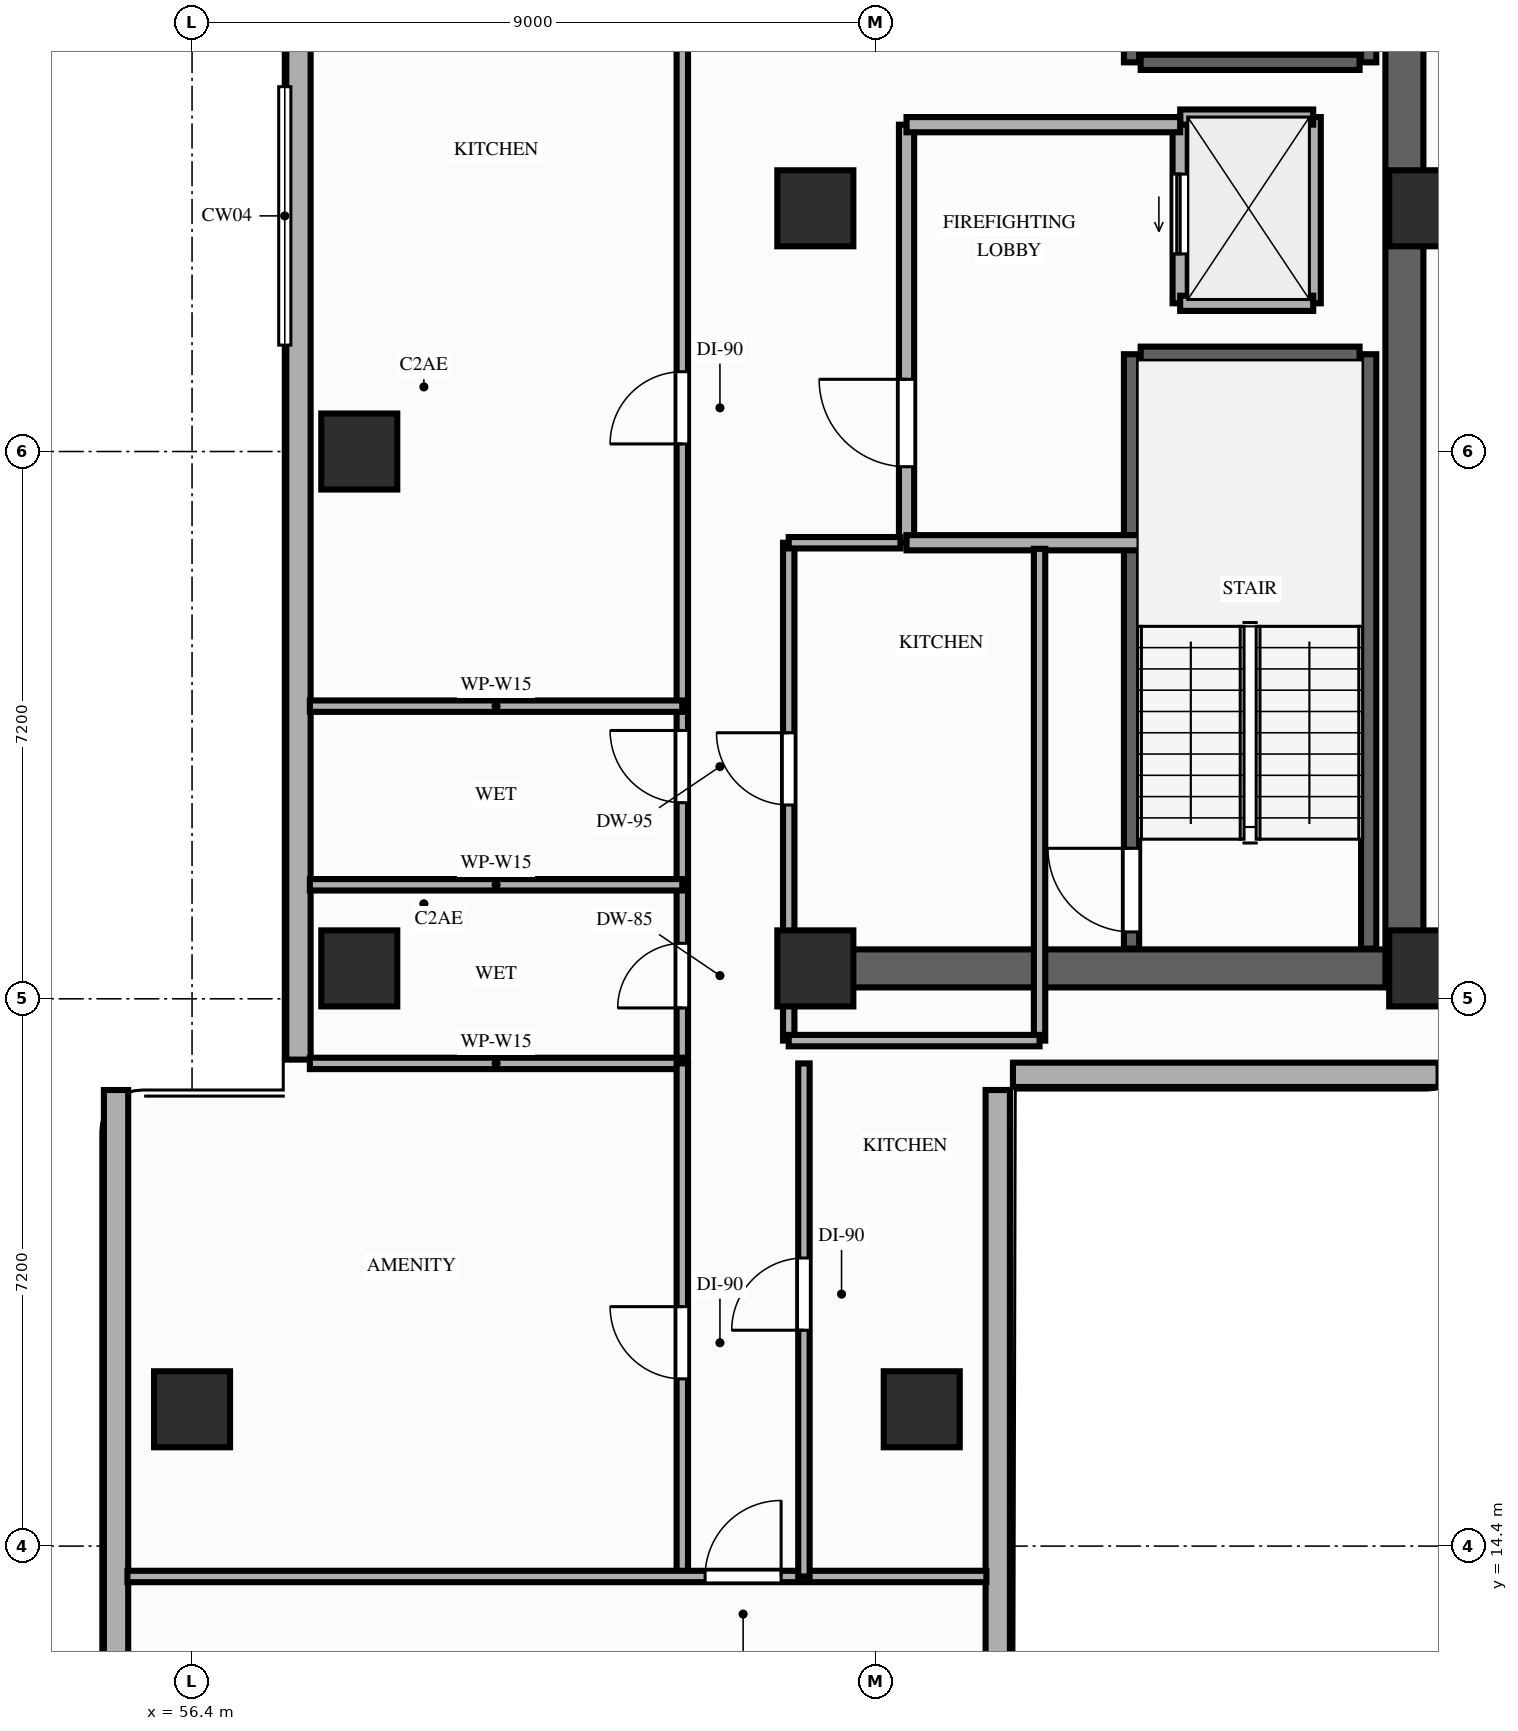
"""IFC4 building model, lengths in metres.
Left out: names, types, materials, properties, quantities, classifications, styles, units other than length and angle.
Written with IfcOpenShell. Run it as: python <this file> out.ifc"""

import sys

from ifc_helpers import new_model, si_unit, direction, frame, frame_2d, origin, origin_2d, place, context, subcontext, project, spatial, rectangle, extrude, element, fill, save


model = new_model("IFC4")
c1 = context("Model", 3, precision=1e-05, world=origin(), true_north=direction((0.0, 1.0)))
c2 = subcontext(c1, "Body", "Model", "MODEL_VIEW")
j1 = project(units=[si_unit("LENGTHUNIT", "METRE"), si_unit("PLANEANGLEUNIT", "RADIAN")], contexts=[c1])
p1 = place(None, origin())
s1 = spatial("IfcSite", under=j1, at=p1, CompositionType="ELEMENT")
p2 = place(p1, origin())
s2 = spatial("IfcBuilding", under=s1, at=p2, CompositionType="ELEMENT")
p3 = place(p2, frame((0.0, 0.0, 39.8)))
s3 = spatial("IfcBuildingStorey", under=s2, at=p3, CompositionType="ELEMENT", Elevation=39.8)
for number, where, z_axis, x_axis in (
    (1, (64.6, 22.0, 0.0), (0.0, 0.0, 1.0), (1.0, 0.0, 0.0)),
    (2, (72.65, 22.0, 0.0), (0.0, 0.0, 1.0), (1.0, 0.0, 0.0)),
    (3, (64.6, 32.0, 0.0), (0.0, 0.0, 1.0), (1.0, 0.0, 0.0)),
    (4, (72.65, 32.0, 0.0), (0.0, 0.0, 1.0), (1.0, 0.0, 0.0)),
    (5, (58.6, 22.0, 0.0), (0.0, 0.0, 1.0), (1.0, 0.0, 0.0)),
    (6, (58.6, 28.8, 0.0), (0.0, 0.0, 1.0), (1.0, 0.0, 0.0)),
    (7, (56.4, 16.2, 0.0), (0.0, 0.0, 1.0), (1.0, 0.0, 0.0)),
    (8, (66.0, 16.2, 0.0), (0.0, 0.0, 1.0), (1.0, 0.0, 0.0)),
):
    element("IfcColumn", number, at=place(p3, frame(where, z_axis=z_axis, x_axis=x_axis)), inside=s3, PredefinedType="COLUMN", context=c2, shape_type="SweptSolid", body=[
        extrude(rectangle(XDim=1.0, YDim=1.0, at=origin_2d()), origin(), (0.0, 0.0, 1.0), 3.8),
    ])
p4 = place(p3, frame((57.8, 43.4, 0.0), z_axis=(0.0, 0.0, 1.0), x_axis=(0.0, -1.0, 0.0)))
e9 = element("IfcWall", 9, at=p4, inside=s3, PredefinedType="STANDARD", context=c2, shape_type="SweptSolid", body=[
    extrude(rectangle(XDim=22.6, YDim=0.32, at=frame_2d((11.3, 0.0))), origin(), (0.0, 0.0, 1.0), 3.11),
])
p5 = place(p4, frame((3.6, 0.0, 0.85)))
e10 = element("IfcOpeningElement", 10, at=p5, cuts=e9, PredefinedType="OPENING", context=c2, shape_type="SweptSolid", body=[
    extrude(rectangle(XDim=1.6, YDim=1.7, at=frame_2d((0.8, 0.85))), frame((0.0, 0.17, 0.0), z_axis=(0.0, -1.0, 0.0), x_axis=(1.0, 0.0, 0.0)), (0.0, 0.0, 1.0), 0.34),
])
for number, where, z_axis, x_axis in (
    (11, (55.4, 20.4, 0.0), (0.0, 0.0, 1.0), (0.0, -1.0, 0.0)),
    (12, (67.0, 7.6, 0.0), (0.0, 0.0, 1.0), (0.0, 1.0, 0.0)),
):
    element("IfcWall", number, at=place(p3, frame(where, z_axis=z_axis, x_axis=x_axis)), inside=s3, PredefinedType="STANDARD", context=c2, shape_type="SweptSolid", body=[
        extrude(rectangle(XDim=12.8, YDim=0.32, at=frame_2d((6.4, 0.0))), origin(), (0.0, 0.0, 1.0), 3.62),
    ])
p6 = place(p3, frame((67.2, 20.6, 0.0), z_axis=(0.0, 0.0, 1.0), x_axis=(1.0, 0.0, 0.0)))
e13 = element("IfcWall", 13, at=p6, inside=s3, PredefinedType="STANDARD", context=c2, shape_type="SweptSolid", body=[
    extrude(rectangle(XDim=5.6, YDim=0.32, at=frame_2d((2.8, 0.0))), origin(), (0.0, 0.0, 1.0), 3.62),
])
p7 = place(p3, frame((72.35, 22.0, 0.0), z_axis=(0.0, 0.0, 1.0), x_axis=(0.0, 1.0, 0.0)))
e14 = element("IfcWall", 14, at=p7, inside=s3, PredefinedType="SHEAR", context=c2, shape_type="SweptSolid", body=[
    extrude(rectangle(XDim=20.25, YDim=0.5, at=frame_2d((10.125, 0.0))), origin(), (0.0, 0.0, 1.0), 3.62),
])
p8 = place(p3, frame((64.6, 22.0, 0.0), z_axis=(0.0, 0.0, 1.0), x_axis=(1.0, 0.0, 0.0)))
e15 = element("IfcWall", 15, at=p8, inside=s3, PredefinedType="SHEAR", context=c2, shape_type="SweptSolid", body=[
    extrude(rectangle(XDim=7.5, YDim=0.5, at=frame_2d((3.75, 0.0))), origin(), (0.0, 0.0, 1.0), 3.62),
])
p9 = place(p3, frame((68.76, 22.26, 0.0), z_axis=(0.0, 0.0, 1.0), x_axis=(0.0, 1.0, 0.0)))
e16 = element("IfcWall", 16, at=p9, inside=s3, PredefinedType="SHEAR", context=c2, shape_type="SweptSolid", body=[
    extrude(rectangle(XDim=7.82, YDim=0.2, at=frame_2d((3.91, 0.0))), origin(), (0.0, 0.0, 1.0), 3.62),
])
p10 = place(p9, frame((0.22, 0.0, 0.0)))
e17 = element("IfcOpeningElement", 17, at=p10, cuts=e16, PredefinedType="OPENING", context=c2, shape_type="SweptSolid", body=[
    extrude(rectangle(XDim=1.1, YDim=2.15, at=frame_2d((0.55, 1.075))), frame((0.0, 0.11, 0.0), z_axis=(0.0, -1.0, 0.0), x_axis=(1.0, 0.0, 0.0)), (0.0, 0.0, 1.0), 0.22),
])
p11 = place(p3, frame((71.88, 22.26, 0.0), z_axis=(0.0, 0.0, 1.0), x_axis=(0.0, 1.0, 0.0)))
e18 = element("IfcWall", 18, at=p11, inside=s3, PredefinedType="SHEAR", context=c2, shape_type="SweptSolid", body=[
    extrude(rectangle(XDim=7.82, YDim=0.2, at=frame_2d((3.91, 0.0))), origin(), (0.0, 0.0, 1.0), 3.62),
])
p12 = place(p3, frame((68.88, 30.08, 0.0), z_axis=(0.0, 0.0, 1.0), x_axis=(1.0, 0.0, 0.0)))
e19 = element("IfcWall", 19, at=p12, inside=s3, PredefinedType="SHEAR", context=c2, shape_type="SweptSolid", body=[
    extrude(rectangle(XDim=2.88, YDim=0.2, at=frame_2d((1.44, 0.0))), origin(), (0.0, 0.0, 1.0), 3.62),
])
p13 = place(p3, frame((68.76, 33.92, 0.0), z_axis=(0.0, 0.0, 1.0), x_axis=(0.0, 1.0, 0.0)))
e20 = element("IfcWall", 20, at=p13, inside=s3, PredefinedType="SHEAR", context=c2, shape_type="SweptSolid", body=[
    extrude(rectangle(XDim=7.96, YDim=0.2, at=frame_2d((3.98, 0.0))), origin(), (0.0, 0.0, 1.0), 3.62),
])
p14 = place(p13, frame((0.22, 0.0, 0.0)))
e21 = element("IfcOpeningElement", 21, at=p14, cuts=e20, PredefinedType="OPENING", context=c2, shape_type="SweptSolid", body=[
    extrude(rectangle(XDim=1.1, YDim=2.15, at=frame_2d((0.55, 1.075))), frame((0.0, 0.11, 0.0), z_axis=(0.0, -1.0, 0.0), x_axis=(1.0, 0.0, 0.0)), (0.0, 0.0, 1.0), 0.22),
])
p15 = place(p3, frame((71.88, 33.92, 0.0), z_axis=(0.0, 0.0, 1.0), x_axis=(0.0, 1.0, 0.0)))
e22 = element("IfcWall", 22, at=p15, inside=s3, PredefinedType="SHEAR", context=c2, shape_type="SweptSolid", body=[
    extrude(rectangle(XDim=7.96, YDim=0.2, at=frame_2d((3.98, 0.0))), origin(), (0.0, 0.0, 1.0), 3.62),
])
p16 = place(p3, frame((68.88, 33.92, 0.0), z_axis=(0.0, 0.0, 1.0), x_axis=(1.0, 0.0, 0.0)))
e23 = element("IfcWall", 23, at=p16, inside=s3, PredefinedType="SHEAR", context=c2, shape_type="SweptSolid", body=[
    extrude(rectangle(XDim=2.88, YDim=0.2, at=frame_2d((1.44, 0.0))), origin(), (0.0, 0.0, 1.0), 3.62),
])
p17 = place(p3, frame((69.4, 30.75, 0.0), z_axis=(0.0, 0.0, 1.0), x_axis=(0.0, 1.0, 0.0)))
e24 = element("IfcWall", 24, at=p17, inside=s3, PredefinedType="MOVABLE", context=c2, shape_type="SweptSolid", body=[
    extrude(rectangle(XDim=2.45, YDim=0.2, at=frame_2d((1.225, 0.0))), origin(), (0.0, 0.0, 1.0), 3.62),
])
p18 = place(p17, frame((0.65, 0.0, 0.0)))
e25 = element("IfcOpeningElement", 25, at=p18, cuts=e24, PredefinedType="OPENING", context=c2, shape_type="SweptSolid", body=[
    extrude(rectangle(XDim=1.05, YDim=2.15, at=frame_2d((0.525, 1.075))), frame((0.0, 0.11, 0.0), z_axis=(0.0, -1.0, 0.0), x_axis=(1.0, 0.0, 0.0)), (0.0, 0.0, 1.0), 0.22),
])
p19 = place(p3, frame((71.15, 30.75, 0.0), z_axis=(0.0, 0.0, 1.0), x_axis=(0.0, 1.0, 0.0)))
e26 = element("IfcWall", 26, at=p19, inside=s3, PredefinedType="MOVABLE", context=c2, shape_type="SweptSolid", body=[
    extrude(rectangle(XDim=2.45, YDim=0.2, at=frame_2d((1.225, 0.0))), origin(), (0.0, 0.0, 1.0), 3.62),
])
for number, where, z_axis, x_axis in (
    (27, (69.4, 33.2, 0.0), (0.0, 0.0, 1.0), (1.0, 0.0, 0.0)),
    (28, (69.4, 30.75, 0.0), (0.0, 0.0, 1.0), (1.0, 0.0, 0.0)),
):
    element("IfcWall", number, at=place(p3, frame(where, z_axis=z_axis, x_axis=x_axis)), inside=s3, PredefinedType="MOVABLE", context=c2, shape_type="SweptSolid", body=[
        extrude(rectangle(XDim=1.75, YDim=0.2, at=frame_2d((0.875, 0.0))), origin(), (0.0, 0.0, 1.0), 3.62),
    ])
p20 = place(p3, frame((65.8, 27.6, 0.0), z_axis=(0.0, 0.0, 1.0), x_axis=(0.0, 1.0, 0.0)))
e29 = element("IfcWall", 29, at=p20, inside=s3, PredefinedType="PARTITIONING", context=c2, shape_type="SweptSolid", body=[
    extrude(rectangle(XDim=5.5, YDim=0.2, at=frame_2d((2.75, 0.0))), origin(), (0.0, 0.0, 1.0), 3.62),
])
p21 = place(p20, frame((1.0, 0.0, 0.0)))
e30 = element("IfcOpeningElement", 30, at=p21, cuts=e29, PredefinedType="OPENING", context=c2, shape_type="SweptSolid", body=[
    extrude(rectangle(XDim=1.15, YDim=2.15, at=frame_2d((0.575, 1.075))), frame((0.0, 0.11, 0.0), z_axis=(0.0, -1.0, 0.0), x_axis=(1.0, 0.0, 0.0)), (0.0, 0.0, 1.0), 0.22),
])
p22 = place(p3, frame((65.8, 33.1, 0.0), z_axis=(0.0, 0.0, 1.0), x_axis=(1.0, 0.0, 0.0)))
e31 = element("IfcWall", 31, at=p22, inside=s3, PredefinedType="PARTITIONING", context=c2, shape_type="SweptSolid", body=[
    extrude(rectangle(XDim=3.6, YDim=0.2, at=frame_2d((1.8, 0.0))), origin(), (0.0, 0.0, 1.0), 3.62),
])
p23 = place(p3, frame((65.8, 27.6, 0.0), z_axis=(0.0, 0.0, 1.0), x_axis=(1.0, 0.0, 0.0)))
e32 = element("IfcWall", 32, at=p23, inside=s3, PredefinedType="PARTITIONING", context=c2, shape_type="SweptSolid", body=[
    extrude(rectangle(XDim=3.4, YDim=0.2, at=frame_2d((1.7, 0.0))), origin(), (0.0, 0.0, 1.0), 3.62),
])
p24 = place(p3, frame((64.25, 21.05, 0.0), z_axis=(0.0, 0.0, 1.0), x_axis=(0.0, 1.0, 0.0)))
e33 = element("IfcWall", 33, at=p24, inside=s3, PredefinedType="PARTITIONING", context=c2, shape_type="SweptSolid", body=[
    extrude(rectangle(XDim=6.55, YDim=0.15, at=frame_2d((3.275, 0.0))), origin(), (0.0, 0.0, 1.0), 3.11),
])
p25 = place(p24, frame((3.1, 0.0, 0.0)))
e34 = element("IfcOpeningElement", 34, at=p25, cuts=e33, PredefinedType="OPENING", context=c2, shape_type="SweptSolid", body=[
    extrude(rectangle(XDim=0.95, YDim=2.15, at=frame_2d((0.475, 1.075))), frame((0.0, 0.085, 0.0), z_axis=(0.0, -1.0, 0.0), x_axis=(1.0, 0.0, 0.0)), (0.0, 0.0, 1.0), 0.17),
])
p26 = place(p3, frame((67.55, 21.05, 0.0), z_axis=(0.0, 0.0, 1.0), x_axis=(0.0, 1.0, 0.0)))
e35 = element("IfcWall", 35, at=p26, inside=s3, PredefinedType="PARTITIONING", context=c2, shape_type="SweptSolid", body=[
    extrude(rectangle(XDim=6.47, YDim=0.15, at=frame_2d((3.235, 0.0))), origin(), (0.0, 0.0, 1.0), 3.11),
])
p27 = place(p3, frame((64.25, 21.05, 0.0), z_axis=(0.0, 0.0, 1.0), x_axis=(1.0, 0.0, 0.0)))
e36 = element("IfcWall", 36, at=p27, inside=s3, PredefinedType="PARTITIONING", context=c2, shape_type="SweptSolid", body=[
    extrude(rectangle(XDim=3.3, YDim=0.15, at=frame_2d((1.65, 0.0))), origin(), (0.0, 0.0, 1.0), 3.11),
])
p28 = place(p3, frame((64.25, 27.6, 0.0), z_axis=(0.0, 0.0, 1.0), x_axis=(1.0, 0.0, 0.0)))
e37 = element("IfcWall", 37, at=p28, inside=s3, PredefinedType="PARTITIONING", context=c2, shape_type="SweptSolid", body=[
    extrude(rectangle(XDim=1.47, YDim=0.15, at=frame_2d((0.735, 0.0))), origin(), (0.0, 0.0, 1.0), 3.11),
])
p29 = place(p3, frame((62.85, 20.75, 0.0), z_axis=(0.0, 0.0, 1.0), x_axis=(0.0, 1.0, 0.0)))
e38 = element("IfcWall", 38, at=p29, inside=s3, PredefinedType="PARTITIONING", context=c2, shape_type="SweptSolid", body=[
    extrude(rectangle(XDim=22.7, YDim=0.15, at=frame_2d((11.35, 0.0))), origin(), (0.0, 0.0, 1.0), 3.11),
])
p30 = place(p29, frame((0.73, 0.0, 0.0)))
e39 = element("IfcOpeningElement", 39, at=p30, cuts=e38, PredefinedType="OPENING", context=c2, shape_type="SweptSolid", body=[
    extrude(rectangle(XDim=0.85, YDim=2.1, at=frame_2d((0.425, 1.05))), frame((0.0, 0.085, 0.0), z_axis=(0.0, -1.0, 0.0), x_axis=(1.0, 0.0, 0.0)), (0.0, 0.0, 1.0), 0.17),
])
p31 = place(p29, frame((3.43, 0.0, 0.0)))
e40 = element("IfcOpeningElement", 40, at=p31, cuts=e38, PredefinedType="OPENING", context=c2, shape_type="SweptSolid", body=[
    extrude(rectangle(XDim=0.95, YDim=2.1, at=frame_2d((0.475, 1.05))), frame((0.0, 0.085, 0.0), z_axis=(0.0, -1.0, 0.0), x_axis=(1.0, 0.0, 0.0)), (0.0, 0.0, 1.0), 0.17),
])
p32 = place(p29, frame((8.15, 0.0, 0.0)))
e41 = element("IfcOpeningElement", 41, at=p32, cuts=e38, PredefinedType="OPENING", context=c2, shape_type="SweptSolid", body=[
    extrude(rectangle(XDim=0.95, YDim=2.15, at=frame_2d((0.475, 1.075))), frame((0.0, 0.085, 0.0), z_axis=(0.0, -1.0, 0.0), x_axis=(1.0, 0.0, 0.0)), (0.0, 0.0, 1.0), 0.17),
])
for number, where, z_axis, x_axis in (
    (42, (57.95, 20.75, 0.0), (0.0, 0.0, 1.0), (1.0, 0.0, 0.0)),
    (43, (57.95, 23.1, 0.0), (0.0, 0.0, 1.0), (1.0, 0.0, 0.0)),
    (44, (57.95, 25.45, 0.0), (0.0, 0.0, 1.0), (1.0, 0.0, 0.0)),
):
    element("IfcWall", number, at=place(p3, frame(where, z_axis=z_axis, x_axis=x_axis)), inside=s3, PredefinedType="PARTITIONING", context=c2, shape_type="SweptSolid", body=[
        extrude(rectangle(XDim=4.9, YDim=0.15, at=frame_2d((2.45, 0.0))), origin(), (0.0, 0.0, 1.0), 3.11),
    ])
p33 = place(p3, frame((62.85, 14.0, 0.0), z_axis=(0.0, 0.0, 1.0), x_axis=(0.0, 1.0, 0.0)))
e45 = element("IfcWall", 45, at=p33, inside=s3, PredefinedType="PARTITIONING", context=c2, shape_type="SweptSolid", body=[
    extrude(rectangle(XDim=6.75, YDim=0.15, at=frame_2d((3.375, 0.0))), origin(), (0.0, 0.0, 1.0), 3.11),
])
p34 = place(p33, frame((2.6, 0.0, 0.0)))
e46 = element("IfcOpeningElement", 46, at=p34, cuts=e45, PredefinedType="OPENING", context=c2, shape_type="SweptSolid", body=[
    extrude(rectangle(XDim=0.95, YDim=2.15, at=frame_2d((0.475, 1.075))), frame((0.0, 0.085, 0.0), z_axis=(0.0, -1.0, 0.0), x_axis=(1.0, 0.0, 0.0)), (0.0, 0.0, 1.0), 0.17),
])
p35 = place(p3, frame((55.55, 14.0, 0.0), z_axis=(0.0, 0.0, 1.0), x_axis=(1.0, 0.0, 0.0)))
e47 = element("IfcWall", 47, at=p35, inside=s3, PredefinedType="PARTITIONING", context=c2, shape_type="SweptSolid", body=[
    extrude(rectangle(XDim=11.3, YDim=0.15, at=frame_2d((5.65, 0.0))), origin(), (0.0, 0.0, 1.0), 3.11),
])
p36 = place(p35, frame((7.6, 0.0, 0.0)))
e48 = element("IfcOpeningElement", 48, at=p36, cuts=e47, PredefinedType="OPENING", context=c2, shape_type="SweptSolid", body=[
    extrude(rectangle(XDim=1.0, YDim=2.15, at=frame_2d((0.5, 1.075))), frame((0.0, 0.085, 0.0), z_axis=(0.0, -1.0, 0.0), x_axis=(1.0, 0.0, 0.0)), (0.0, 0.0, 1.0), 0.17),
])
p37 = place(p3, frame((64.45, 14.0, 0.0), z_axis=(0.0, 0.0, 1.0), x_axis=(0.0, 1.0, 0.0)))
e49 = element("IfcWall", 49, at=p37, inside=s3, PredefinedType="PARTITIONING", context=c2, shape_type="SweptSolid", body=[
    extrude(rectangle(XDim=6.75, YDim=0.15, at=frame_2d((3.375, 0.0))), origin(), (0.0, 0.0, 1.0), 3.11),
])
p38 = place(p37, frame((3.24, 0.0, 0.0)))
e50 = element("IfcOpeningElement", 50, at=p38, cuts=e49, PredefinedType="OPENING", context=c2, shape_type="SweptSolid", body=[
    extrude(rectangle(XDim=0.95, YDim=2.15, at=frame_2d((0.475, 1.075))), frame((0.0, 0.085, 0.0), z_axis=(0.0, -1.0, 0.0), x_axis=(1.0, 0.0, 0.0)), (0.0, 0.0, 1.0), 0.17),
])
p39 = place(p10, origin())
e51 = element("IfcDoor", 51, at=p39, inside=s3, OperationType="SINGLE_SWING_RIGHT", PredefinedType="DOOR", context=c2, shape_type="SweptSolid", body=[
    extrude(rectangle(XDim=1.1, YDim=2.15, at=frame_2d((0.55, 1.075))), frame((0.0, 0.025, 0.0), z_axis=(0.0, -1.0, 0.0), x_axis=(1.0, 0.0, 0.0)), (0.0, 0.0, 1.0), 0.05),
])
fill(e17, e51)
p40 = place(p18, origin())
e52 = element("IfcDoor", 52, at=p40, inside=s3, OperationType="SLIDING_TO_LEFT", PredefinedType="DOOR", context=c2, shape_type="SweptSolid", body=[
    extrude(rectangle(XDim=1.05, YDim=2.15, at=frame_2d((0.525, 1.075))), frame((0.0, 0.025, 0.0), z_axis=(0.0, -1.0, 0.0), x_axis=(1.0, 0.0, 0.0)), (0.0, 0.0, 1.0), 0.05),
])
fill(e25, e52)
p41 = place(p21, origin())
e53 = element("IfcDoor", 53, at=p41, inside=s3, OperationType="SINGLE_SWING_RIGHT", PredefinedType="DOOR", context=c2, shape_type="SweptSolid", body=[
    extrude(rectangle(XDim=1.15, YDim=2.15, at=frame_2d((0.575, 1.075))), frame((0.0, 0.025, 0.0), z_axis=(0.0, -1.0, 0.0), x_axis=(1.0, 0.0, 0.0)), (0.0, 0.0, 1.0), 0.05),
])
fill(e30, e53)
p42 = place(p25, origin())
e54 = element("IfcDoor", 54, at=p42, inside=s3, OperationType="SINGLE_SWING_RIGHT", PredefinedType="DOOR", context=c2, shape_type="SweptSolid", body=[
    extrude(rectangle(XDim=0.95, YDim=2.15, at=frame_2d((0.475, 1.075))), frame((0.0, 0.025, 0.0), z_axis=(0.0, -1.0, 0.0), x_axis=(1.0, 0.0, 0.0)), (0.0, 0.0, 1.0), 0.05),
])
fill(e34, e54)
p43 = place(p30, origin())
e55 = element("IfcDoor", 55, at=p43, inside=s3, OperationType="SINGLE_SWING_LEFT", PredefinedType="DOOR", context=c2, shape_type="SweptSolid", body=[
    extrude(rectangle(XDim=0.85, YDim=2.1, at=frame_2d((0.425, 1.05))), frame((0.0, 0.025, 0.0), z_axis=(0.0, -1.0, 0.0), x_axis=(1.0, 0.0, 0.0)), (0.0, 0.0, 1.0), 0.05),
])
fill(e39, e55)
p44 = place(p31, origin())
e56 = element("IfcDoor", 56, at=p44, inside=s3, OperationType="SINGLE_SWING_RIGHT", PredefinedType="DOOR", context=c2, shape_type="SweptSolid", body=[
    extrude(rectangle(XDim=0.95, YDim=2.1, at=frame_2d((0.475, 1.05))), frame((0.0, 0.025, 0.0), z_axis=(0.0, -1.0, 0.0), x_axis=(1.0, 0.0, 0.0)), (0.0, 0.0, 1.0), 0.05),
])
fill(e40, e56)
p45 = place(p32, origin())
e57 = element("IfcDoor", 57, at=p45, inside=s3, OperationType="SINGLE_SWING_LEFT", PredefinedType="DOOR", context=c2, shape_type="SweptSolid", body=[
    extrude(rectangle(XDim=0.95, YDim=2.15, at=frame_2d((0.475, 1.075))), frame((0.0, 0.025, 0.0), z_axis=(0.0, -1.0, 0.0), x_axis=(1.0, 0.0, 0.0)), (0.0, 0.0, 1.0), 0.05),
])
fill(e41, e57)
p46 = place(p34, origin())
e58 = element("IfcDoor", 58, at=p46, inside=s3, OperationType="SINGLE_SWING_RIGHT", PredefinedType="DOOR", context=c2, shape_type="SweptSolid", body=[
    extrude(rectangle(XDim=0.95, YDim=2.15, at=frame_2d((0.475, 1.075))), frame((0.0, 0.025, 0.0), z_axis=(0.0, -1.0, 0.0), x_axis=(1.0, 0.0, 0.0)), (0.0, 0.0, 1.0), 0.05),
])
fill(e46, e58)
p47 = place(p38, origin())
e59 = element("IfcDoor", 59, at=p47, inside=s3, OperationType="SINGLE_SWING_LEFT", PredefinedType="DOOR", context=c2, shape_type="SweptSolid", body=[
    extrude(rectangle(XDim=0.95, YDim=2.15, at=frame_2d((0.475, 1.075))), frame((0.0, 0.025, 0.0), z_axis=(0.0, -1.0, 0.0), x_axis=(1.0, 0.0, 0.0)), (0.0, 0.0, 1.0), 0.05),
])
fill(e50, e59)
p48 = place(p36, origin())
e60 = element("IfcDoor", 60, at=p48, inside=s3, OperationType="SINGLE_SWING_RIGHT", PredefinedType="DOOR", context=c2, shape_type="SweptSolid", body=[
    extrude(rectangle(XDim=1.0, YDim=2.15, at=frame_2d((0.5, 1.075))), frame((0.0, 0.025, 0.0), z_axis=(0.0, -1.0, 0.0), x_axis=(1.0, 0.0, 0.0)), (0.0, 0.0, 1.0), 0.05),
])
fill(e48, e60)
save(model, sys.argv[1])
